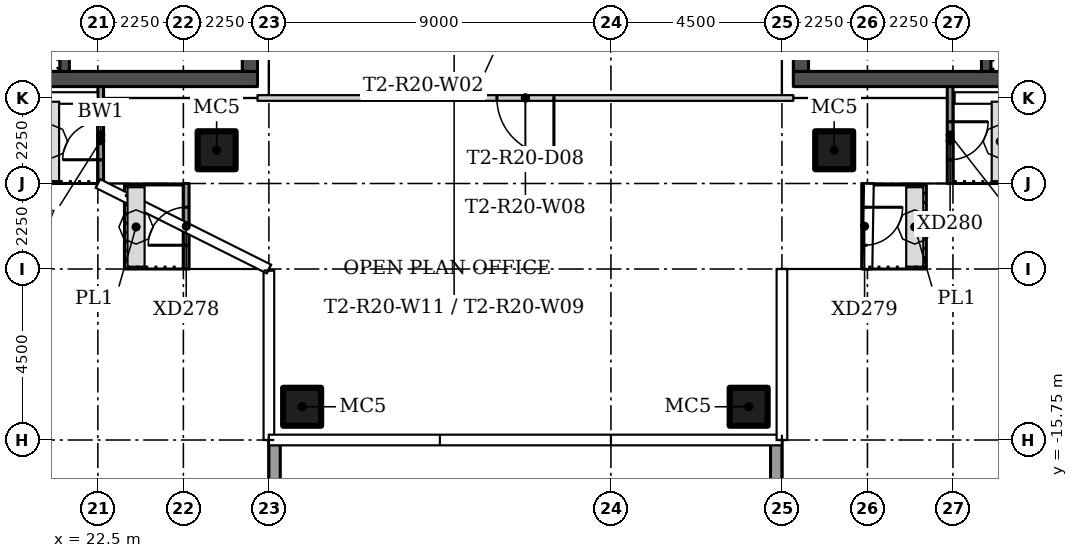
"""IFC4 building model, lengths in metres.
Left out: names, types, materials, properties, quantities, classifications, styles, units other than length and angle.
Written with IfcOpenShell. Run it as: python <this file> out.ifc"""

import sys

from ifc_helpers import new_model, si_unit, direction, frame, frame_2d, origin, origin_2d, place, context, subcontext, project, spatial, rectangle, hollow_rectangle, extrude, element, fill, save


model = new_model("IFC4")
c1 = context("Model", 3, precision=1e-05, world=origin(), true_north=direction((0.0, 1.0)))
c2 = subcontext(c1, "Body", "Model", "MODEL_VIEW")
j1 = project(units=[si_unit("LENGTHUNIT", "METRE"), si_unit("PLANEANGLEUNIT", "RADIAN")], contexts=[c1])
p1 = place(None, origin())
s1 = spatial("IfcSite", under=j1, at=p1, CompositionType="ELEMENT")
p2 = place(p1, origin())
s2 = spatial("IfcBuilding", under=s1, at=p2, CompositionType="ELEMENT")
p3 = place(p2, frame((0.0, 0.0, 182.7)))
s3 = spatial("IfcBuildingStorey", under=s2, at=p3, CompositionType="ELEMENT", Elevation=182.7)
for number, where in (
    (1, (25.625, -8.125, 0.0)),
    (2, (41.875, -8.125, 0.0)),
    (3, (39.625, -14.875, 0.0)),
    (4, (27.875, -14.875, 0.0)),
):
    element("IfcColumn", number, at=place(p3, frame(where)), inside=s3, PredefinedType="COLUMN", context=c2, shape_type="SweptSolid", body=[
        extrude(hollow_rectangle(XDim=1.0, YDim=1.0, WallThickness=0.04, at=origin_2d()), origin(), (0.0, 0.0, 1.0), 3.55),
    ])
p4 = place(p3, frame((40.8, -6.75, 0.0), z_axis=(0.0, 0.0, 1.0), x_axis=(-1.0, 0.0, 0.0)))
e5 = element("IfcWall", 5, at=p4, inside=s3, PredefinedType="PARTITIONING", context=c2, shape_type="SweptSolid", body=[
    extrude(rectangle(XDim=14.1, YDim=0.15, at=frame_2d((7.05, 0.0))), origin(), (0.0, 0.0, 1.0), 3.55),
])
p5 = place(p4, frame((6.3, 0.0, 0.0)))
e6 = element("IfcOpeningElement", 6, at=p5, cuts=e5, PredefinedType="OPENING", context=c2, shape_type="SweptSolid", body=[
    extrude(rectangle(XDim=1.5, YDim=2.1, at=frame_2d((0.75, 1.05))), frame((0.0, 0.085, 0.0), z_axis=(0.0, -1.0, 0.0), x_axis=(1.0, 0.0, 0.0)), (0.0, 0.0, 1.0), 0.17),
])
p6 = place(p3, frame((27.15, -15.75, 0.0), z_axis=(0.0, 0.0, 1.0), x_axis=(0.0, -1.0, 0.0)))
e7 = element("IfcWall", 7, at=p6, inside=s3, PredefinedType="PARAPET", context=c2, shape_type="SweptSolid", body=[
    extrude(rectangle(XDim=4.5, YDim=0.3, at=frame_2d((2.25, 0.0))), origin(), (0.0, 0.0, 1.0), 1.1),
])
p7 = place(p3, frame((40.35, -19.95, 0.0), z_axis=(0.0, 0.0, 1.0), x_axis=(0.0, 1.0, 0.0)))
e8 = element("IfcWall", 8, at=p7, inside=s3, PredefinedType="PARAPET", context=c2, shape_type="SweptSolid", body=[
    extrude(rectangle(XDim=4.2, YDim=0.3, at=frame_2d((2.1, 0.0))), origin(), (0.0, 0.0, 1.0), 1.1),
])
p8 = place(p3, frame((22.575, -9.0, 0.0), z_axis=(0.0, 0.0, 1.0), x_axis=(0.0, 1.0, 0.0)))
e9 = element("IfcWall", 9, at=p8, inside=s3, PredefinedType="SOLIDWALL", context=c2, shape_type="SweptSolid", body=[
    extrude(rectangle(XDim=2.557, YDim=0.15, at=frame_2d((1.278, 0.0))), origin(), (0.0, 0.0, 1.0), 3.45),
])
p9 = place(p8, frame((0.625, 0.0, 0.0)))
e10 = element("IfcOpeningElement", 10, at=p9, cuts=e9, PredefinedType="OPENING", context=c2, shape_type="SweptSolid", body=[
    extrude(rectangle(XDim=1.0, YDim=2.4, at=frame_2d((0.5, 1.2))), frame((0.0, 0.085, 0.0), z_axis=(0.0, -1.0, 0.0), x_axis=(1.0, 0.0, 0.0)), (0.0, 0.0, 1.0), 0.17),
])
p10 = place(p3, frame((24.825, -11.25, 0.0), z_axis=(0.0, 0.0, 1.0), x_axis=(0.0, 1.0, 0.0)))
e11 = element("IfcWall", 11, at=p10, inside=s3, PredefinedType="SOLIDWALL", context=c2, shape_type="SweptSolid", body=[
    extrude(rectangle(XDim=2.25, YDim=0.15, at=frame_2d((1.125, 0.0))), origin(), (0.0, 0.0, 1.0), 3.45),
])
p11 = place(p10, frame((0.625, 0.0, 0.0)))
e12 = element("IfcOpeningElement", 12, at=p11, cuts=e11, PredefinedType="OPENING", context=c2, shape_type="SweptSolid", body=[
    extrude(rectangle(XDim=1.0, YDim=2.4, at=frame_2d((0.5, 1.2))), frame((0.0, 0.085, 0.0), z_axis=(0.0, -1.0, 0.0), x_axis=(1.0, 0.0, 0.0)), (0.0, 0.0, 1.0), 0.17),
])
p12 = place(p3, frame((42.675, -9.0, 0.0), z_axis=(0.0, 0.0, 1.0), x_axis=(0.0, -1.0, 0.0)))
e13 = element("IfcWall", 13, at=p12, inside=s3, PredefinedType="SOLIDWALL", context=c2, shape_type="SweptSolid", body=[
    extrude(rectangle(XDim=2.25, YDim=0.15, at=frame_2d((1.125, 0.0))), origin(), (0.0, 0.0, 1.0), 3.45),
])
p13 = place(p12, frame((0.625, 0.0, 0.0)))
e14 = element("IfcOpeningElement", 14, at=p13, cuts=e13, PredefinedType="OPENING", context=c2, shape_type="SweptSolid", body=[
    extrude(rectangle(XDim=1.0, YDim=2.4, at=frame_2d((0.5, 1.2))), frame((0.0, 0.085, 0.0), z_axis=(0.0, -1.0, 0.0), x_axis=(1.0, 0.0, 0.0)), (0.0, 0.0, 1.0), 0.17),
])
p14 = place(p3, frame((44.925, -6.448, 0.0), z_axis=(0.0, 0.0, 1.0), x_axis=(0.0, -1.0, 0.0)))
e15 = element("IfcWall", 15, at=p14, inside=s3, PredefinedType="SOLIDWALL", context=c2, shape_type="SweptSolid", body=[
    extrude(rectangle(XDim=2.552, YDim=0.15, at=frame_2d((1.276, 0.0))), origin(), (0.0, 0.0, 1.0), 3.45),
])
p15 = place(p14, frame((0.927, 0.0, 0.0)))
e16 = element("IfcOpeningElement", 16, at=p15, cuts=e15, PredefinedType="OPENING", context=c2, shape_type="SweptSolid", body=[
    extrude(rectangle(XDim=1.0, YDim=2.4, at=frame_2d((0.5, 1.2))), frame((0.0, 0.085, 0.0), z_axis=(0.0, -1.0, 0.0), x_axis=(1.0, 0.0, 0.0)), (0.0, 0.0, 1.0), 0.17),
])
p16 = place(p3, frame((13.8, -6.25, 0.0)))
e17 = element("IfcWall", 17, at=p16, inside=s3, PredefinedType="SHEAR", context=c2, shape_type="SweptSolid", body=[
    extrude(rectangle(XDim=12.9, YDim=0.4, at=frame_2d((6.45, 0.0))), origin(), (0.0, 0.0, 1.0), 3.55),
])
p17 = place(p3, frame((26.5, 6.05, 0.0), z_axis=(0.0, 0.0, 1.0), x_axis=(0.0, -1.0, 0.0)))
e18 = element("IfcWall", 18, at=p17, inside=s3, PredefinedType="SHEAR", context=c2, shape_type="SweptSolid", body=[
    extrude(rectangle(XDim=12.1, YDim=0.4, at=frame_2d((6.05, 0.0))), origin(), (0.0, 0.0, 1.0), 3.55),
])
p18 = place(p17, frame((10.1, 0.0, 0.0)))
e19 = element("IfcOpeningElement", 19, at=p18, cuts=e18, PredefinedType="OPENING", context=c2, shape_type="SweptSolid", body=[
    extrude(rectangle(XDim=1.2, YDim=2.1, at=frame_2d((0.6, 1.05))), frame((0.0, 0.21, 0.0), z_axis=(0.0, -1.0, 0.0), x_axis=(1.0, 0.0, 0.0)), (0.0, 0.0, 1.0), 0.42),
])
p19 = place(p17, frame((3.9, 0.0, 0.0)))
e20 = element("IfcOpeningElement", 20, at=p19, cuts=e18, PredefinedType="OPENING", context=c2, shape_type="SweptSolid", body=[
    extrude(rectangle(XDim=1.8, YDim=2.4, at=frame_2d((0.9, 1.2))), frame((0.0, 0.21, 0.0), z_axis=(0.0, -1.0, 0.0), x_axis=(1.0, 0.0, 0.0)), (0.0, 0.0, 1.0), 0.42),
])
p20 = place(p3, frame((21.625, -6.05, 0.0), z_axis=(0.0, 0.0, 1.0), x_axis=(0.0, 1.0, 0.0)))
e21 = element("IfcWall", 21, at=p20, inside=s3, PredefinedType="SHEAR", context=c2, shape_type="SweptSolid", body=[
    extrude(rectangle(XDim=2.55, YDim=0.25, at=frame_2d((1.275, 0.0))), origin(), (0.0, 0.0, 1.0), 3.55),
])
p21 = place(p3, frame((53.7, -6.25, 0.0), z_axis=(0.0, 0.0, 1.0), x_axis=(-1.0, 0.0, 0.0)))
e22 = element("IfcWall", 22, at=p21, inside=s3, PredefinedType="SHEAR", context=c2, shape_type="SweptSolid", body=[
    extrude(rectangle(XDim=12.9, YDim=0.4, at=frame_2d((6.45, 0.0))), origin(), (0.0, 0.0, 1.0), 3.55),
])
p22 = place(p3, frame((41.0, -6.05, 0.0), z_axis=(0.0, 0.0, 1.0), x_axis=(0.0, 1.0, 0.0)))
e23 = element("IfcWall", 23, at=p22, inside=s3, PredefinedType="SHEAR", context=c2, shape_type="SweptSolid", body=[
    extrude(rectangle(XDim=12.1, YDim=0.4, at=frame_2d((6.05, 0.0))), origin(), (0.0, 0.0, 1.0), 3.55),
])
p23 = place(p22, frame((0.8, 0.0, 0.0)))
e24 = element("IfcOpeningElement", 24, at=p23, cuts=e23, PredefinedType="OPENING", context=c2, shape_type="SweptSolid", body=[
    extrude(rectangle(XDim=1.2, YDim=2.1, at=frame_2d((0.6, 1.05))), frame((0.0, 0.21, 0.0), z_axis=(0.0, -1.0, 0.0), x_axis=(1.0, 0.0, 0.0)), (0.0, 0.0, 1.0), 0.42),
])
p24 = place(p22, frame((6.4, 0.0, 0.0)))
e25 = element("IfcOpeningElement", 25, at=p24, cuts=e23, PredefinedType="OPENING", context=c2, shape_type="SweptSolid", body=[
    extrude(rectangle(XDim=1.8, YDim=2.4, at=frame_2d((0.9, 1.2))), frame((0.0, 0.21, 0.0), z_axis=(0.0, -1.0, 0.0), x_axis=(1.0, 0.0, 0.0)), (0.0, 0.0, 1.0), 0.42),
])
p25 = place(p3, frame((45.875, -6.05, 0.0), z_axis=(0.0, 0.0, 1.0), x_axis=(0.0, 1.0, 0.0)))
e26 = element("IfcWall", 26, at=p25, inside=s3, PredefinedType="SHEAR", context=c2, shape_type="SweptSolid", body=[
    extrude(rectangle(XDim=2.55, YDim=0.25, at=frame_2d((1.275, 0.0))), origin(), (0.0, 0.0, 1.0), 3.55),
])
p26 = place(p5, origin())
e27 = element("IfcDoor", 27, at=p26, inside=s3, OperationType="DOUBLE_DOOR_SINGLE_SWING", PredefinedType="DOOR", context=c2, shape_type="SweptSolid", body=[
    extrude(rectangle(XDim=1.5, YDim=2.1, at=frame_2d((0.75, 1.05))), frame((0.0, 0.025, 0.0), z_axis=(0.0, -1.0, 0.0), x_axis=(1.0, 0.0, 0.0)), (0.0, 0.0, 1.0), 0.05),
])
fill(e6, e27)
p27 = place(p9, origin())
e28 = element("IfcDoor", 28, at=p27, inside=s3, OperationType="SINGLE_SWING_LEFT", PredefinedType="DOOR", context=c2, shape_type="SweptSolid", body=[
    extrude(rectangle(XDim=1.0, YDim=2.4, at=frame_2d((0.5, 1.2))), frame((0.0, 0.025, 0.0), z_axis=(0.0, -1.0, 0.0), x_axis=(1.0, 0.0, 0.0)), (0.0, 0.0, 1.0), 0.05),
])
fill(e10, e28)
p28 = place(p11, origin())
e29 = element("IfcDoor", 29, at=p28, inside=s3, OperationType="SINGLE_SWING_RIGHT", PredefinedType="DOOR", context=c2, shape_type="SweptSolid", body=[
    extrude(rectangle(XDim=1.0, YDim=2.4, at=frame_2d((0.5, 1.2))), frame((0.0, 0.025, 0.0), z_axis=(0.0, -1.0, 0.0), x_axis=(1.0, 0.0, 0.0)), (0.0, 0.0, 1.0), 0.05),
])
fill(e12, e29)
p29 = place(p13, origin())
e30 = element("IfcDoor", 30, at=p29, inside=s3, OperationType="SINGLE_SWING_LEFT", PredefinedType="DOOR", context=c2, shape_type="SweptSolid", body=[
    extrude(rectangle(XDim=1.0, YDim=2.4, at=frame_2d((0.5, 1.2))), frame((0.0, 0.025, 0.0), z_axis=(0.0, -1.0, 0.0), x_axis=(1.0, 0.0, 0.0)), (0.0, 0.0, 1.0), 0.05),
])
fill(e14, e30)
p30 = place(p15, origin())
e31 = element("IfcDoor", 31, at=p30, inside=s3, OperationType="SINGLE_SWING_RIGHT", PredefinedType="DOOR", context=c2, shape_type="SweptSolid", body=[
    extrude(rectangle(XDim=1.0, YDim=2.4, at=frame_2d((0.5, 1.2))), frame((0.0, 0.025, 0.0), z_axis=(0.0, -1.0, 0.0), x_axis=(1.0, 0.0, 0.0)), (0.0, 0.0, 1.0), 0.05),
])
fill(e16, e31)
save(model, sys.argv[1])
